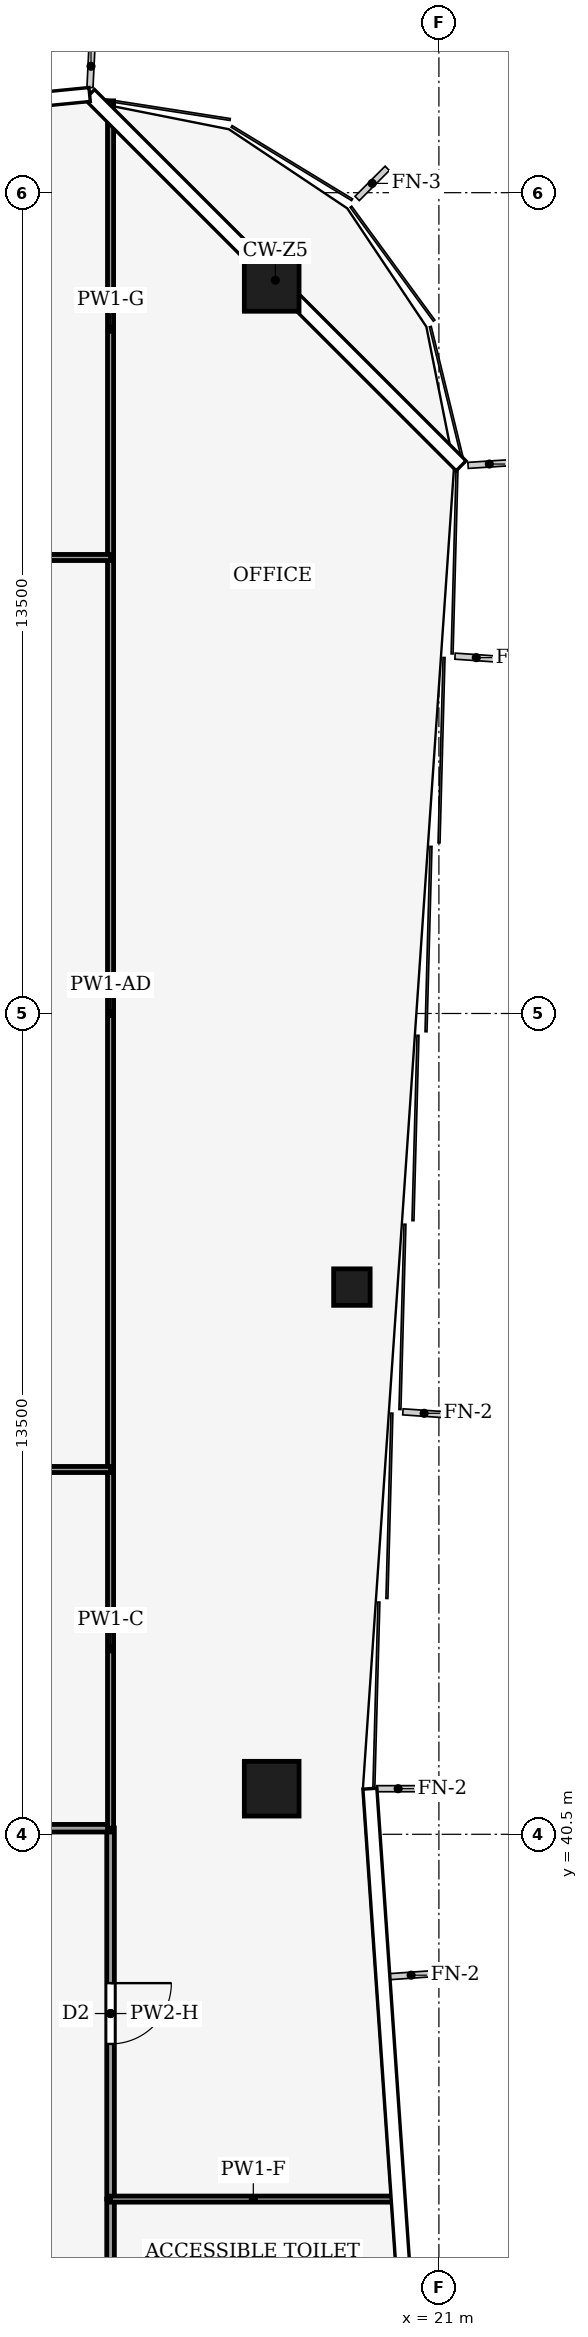
"""IFC4 building model, lengths in metres.
Left out: names, types, materials, properties, quantities, classifications, styles, units other than length and angle.
Written with IfcOpenShell. Run it as: python <this file> out.ifc"""

import sys

from ifc_helpers import new_model, si_unit, direction, frame, frame_2d, origin, origin_2d, place, context, subcontext, project, spatial, rectangle, hollow_rectangle, extrude, element, fill, save


model = new_model("IFC4")
c1 = context("Model", 3, precision=1e-05, world=origin(), true_north=direction((0.0, 1.0)))
c2 = subcontext(c1, "Body", "Model", "MODEL_VIEW")
j1 = project(units=[si_unit("LENGTHUNIT", "METRE"), si_unit("PLANEANGLEUNIT", "RADIAN")], contexts=[c1])
p1 = place(None, origin())
s1 = spatial("IfcSite", under=j1, at=p1, CompositionType="ELEMENT")
p2 = place(p1, origin())
s2 = spatial("IfcBuilding", under=s1, at=p2, CompositionType="ELEMENT")
p3 = place(p2, frame((0.0, 0.0, 306.0)))
s3 = spatial("IfcBuildingStorey", under=s2, at=p3, CompositionType="ELEMENT", Elevation=306.0)
for number, where, z_axis, x_axis in (
    (1, (18.25, 66.0, 0.0), (0.0, 0.0, 1.0), (1.0, 0.0, 0.0)),
    (2, (18.25, 41.25, 0.0), (0.0, 0.0, 1.0), (1.0, 0.0, 0.0)),
):
    element("IfcColumn", number, at=place(p3, frame(where, z_axis=z_axis, x_axis=x_axis)), inside=s3, PredefinedType="COLUMN", context=c2, shape_type="SweptSolid", body=[
        extrude(hollow_rectangle(XDim=0.9, YDim=0.9, WallThickness=0.04, at=origin_2d()), origin(), (0.0, 0.0, 1.0), 4.0),
    ])
p4 = place(p3, frame((19.569, 49.5, 0.0), z_axis=(0.0, 0.0, 1.0), x_axis=(1.0, 0.0, 0.0)))
e3 = element("IfcColumn", 3, at=p4, inside=s3, PredefinedType="COLUMN", context=c2, shape_type="SweptSolid", body=[
    extrude(hollow_rectangle(XDim=0.6, YDim=0.6, WallThickness=0.025, at=origin_2d()), origin(), (0.0, 0.0, 1.0), 4.0),
])
p5 = place(p3, frame((15.6, 34.5, 0.0), z_axis=(0.0, 0.0, 1.0), x_axis=(0.0, -1.0, 0.0)))
e4 = element("IfcWall", 4, at=p5, inside=s3, PredefinedType="PARTITIONING", context=c2, shape_type="SweptSolid", body=[
    extrude(rectangle(XDim=3.0, YDim=0.125, at=frame_2d((1.5, 0.0))), origin(), (0.0, 0.0, 1.0), 3.54),
])
p6 = place(p5, frame((1.05, 0.0, 0.0)))
e5 = element("IfcOpeningElement", 5, at=p6, cuts=e4, PredefinedType="OPENING", context=c2, shape_type="SweptSolid", body=[
    extrude(rectangle(XDim=0.9, YDim=2.1, at=frame_2d((0.45, 1.05))), frame((0.0, 0.073, 0.0), z_axis=(0.0, -1.0, 0.0), x_axis=(1.0, 0.0, 0.0)), (0.0, 0.0, 1.0), 0.145),
])
p7 = place(p3, frame((15.6, 40.604, 0.0), z_axis=(0.0, 0.0, 1.0), x_axis=(0.0, -1.0, 0.0)))
e6 = element("IfcWall", 6, at=p7, inside=s3, PredefinedType="PARTITIONING", context=c2, shape_type="SweptSolid", body=[
    extrude(rectangle(XDim=6.104, YDim=0.125, at=frame_2d((3.052, 0.0))), origin(), (0.0, 0.0, 1.0), 3.14),
])
p8 = place(p7, frame((2.552, 0.0, 0.0)))
e7 = element("IfcOpeningElement", 7, at=p8, cuts=e6, PredefinedType="OPENING", context=c2, shape_type="SweptSolid", body=[
    extrude(rectangle(XDim=1.0, YDim=2.1, at=frame_2d((0.5, 1.05))), frame((0.0, 0.073, 0.0), z_axis=(0.0, -1.0, 0.0), x_axis=(1.0, 0.0, 0.0)), (0.0, 0.0, 1.0), 0.145),
])
p9 = place(p3, frame((15.6, 40.6, 0.0), z_axis=(0.0, 0.0, 1.0), x_axis=(-1.0, 0.0, 0.0)))
e8 = element("IfcWall", 8, at=p9, inside=s3, PredefinedType="PARTITIONING", context=c2, shape_type="SweptSolid", body=[
    extrude(rectangle(XDim=3.6, YDim=0.125, at=frame_2d((1.8, 0.0))), origin(), (0.0, 0.0, 1.0), 3.39),
])
p10 = place(p3, frame((20.295, 34.5, 0.0), z_axis=(0.0, 0.0, 1.0), x_axis=(-1.0, 0.0, 0.0)))
e9 = element("IfcWall", 9, at=p10, inside=s3, PredefinedType="PARTITIONING", context=c2, shape_type="SweptSolid", body=[
    extrude(rectangle(XDim=4.695, YDim=0.1, at=frame_2d((2.348, 0.0))), origin(), (0.0, 0.0, 1.0), 3.04),
])
p11 = place(p3, frame((15.6, 46.5, 0.0), z_axis=(0.0, 0.0, 1.0), x_axis=(0.0, -1.0, 0.0)))
e10 = element("IfcWall", 10, at=p11, inside=s3, PredefinedType="PARTITIONING", context=c2, shape_type="SweptSolid", body=[
    extrude(rectangle(XDim=5.9, YDim=0.1, at=frame_2d((2.95, 0.0))), origin(), (0.0, 0.0, 1.0), 3.87),
])
p12 = place(p3, frame((15.6, 61.5, 0.0), z_axis=(0.0, 0.0, 1.0), x_axis=(0.0, -1.0, 0.0)))
e11 = element("IfcWall", 11, at=p12, inside=s3, PredefinedType="PARTITIONING", context=c2, shape_type="SweptSolid", body=[
    extrude(rectangle(XDim=15.0, YDim=0.1, at=frame_2d((7.5, 0.0))), origin(), (0.0, 0.0, 1.0), 3.35),
])
p13 = place(p3, frame((15.6, 69.01, 0.0), z_axis=(0.0, 0.0, 1.0), x_axis=(0.0, -1.0, 0.0)))
e12 = element("IfcWall", 12, at=p13, inside=s3, PredefinedType="PARTITIONING", context=c2, shape_type="SweptSolid", body=[
    extrude(rectangle(XDim=7.51, YDim=0.1, at=frame_2d((3.755, 0.0))), origin(), (0.0, 0.0, 1.0), 2.93),
])
p14 = place(p3, frame((15.6, 46.5, 0.0), z_axis=(0.0, 0.0, 1.0), x_axis=(-1.0, 0.0, 0.0)))
e13 = element("IfcWall", 13, at=p14, inside=s3, PredefinedType="PARTITIONING", context=c2, shape_type="SweptSolid", body=[
    extrude(rectangle(XDim=3.604, YDim=0.1, at=frame_2d((1.802, 0.0))), origin(), (0.0, 0.0, 1.0), 3.87),
])
p15 = place(p3, frame((6.0, 61.5, 0.0), z_axis=(0.0, 0.0, 1.0), x_axis=(1.0, 0.0, 0.0)))
e14 = element("IfcWall", 14, at=p15, inside=s3, PredefinedType="PARTITIONING", context=c2, shape_type="SweptSolid", body=[
    extrude(rectangle(XDim=9.6, YDim=0.1, at=frame_2d((4.8, 0.0))), origin(), (0.0, 0.0, 1.0), 3.24),
])
p16 = place(p15, frame((4.3, 0.0, 0.0)))
e15 = element("IfcOpeningElement", 15, at=p16, cuts=e14, PredefinedType="OPENING", context=c2, shape_type="SweptSolid", body=[
    extrude(rectangle(XDim=1.0, YDim=2.1, at=frame_2d((0.5, 1.05))), frame((0.0, 0.06, 0.0), z_axis=(0.0, -1.0, 0.0), x_axis=(1.0, 0.0, 0.0)), (0.0, 0.0, 1.0), 0.12),
])
p17 = place(p8, origin())
e16 = element("IfcDoor", 16, at=p17, inside=s3, OperationType="SINGLE_SWING_LEFT", PredefinedType="DOOR", context=c2, shape_type="SweptSolid", body=[
    extrude(rectangle(XDim=1.0, YDim=2.1, at=frame_2d((0.5, 1.05))), frame((0.0, 0.025, 0.0), z_axis=(0.0, -1.0, 0.0), x_axis=(1.0, 0.0, 0.0)), (0.0, 0.0, 1.0), 0.05),
])
fill(e7, e16)
save(model, sys.argv[1])
